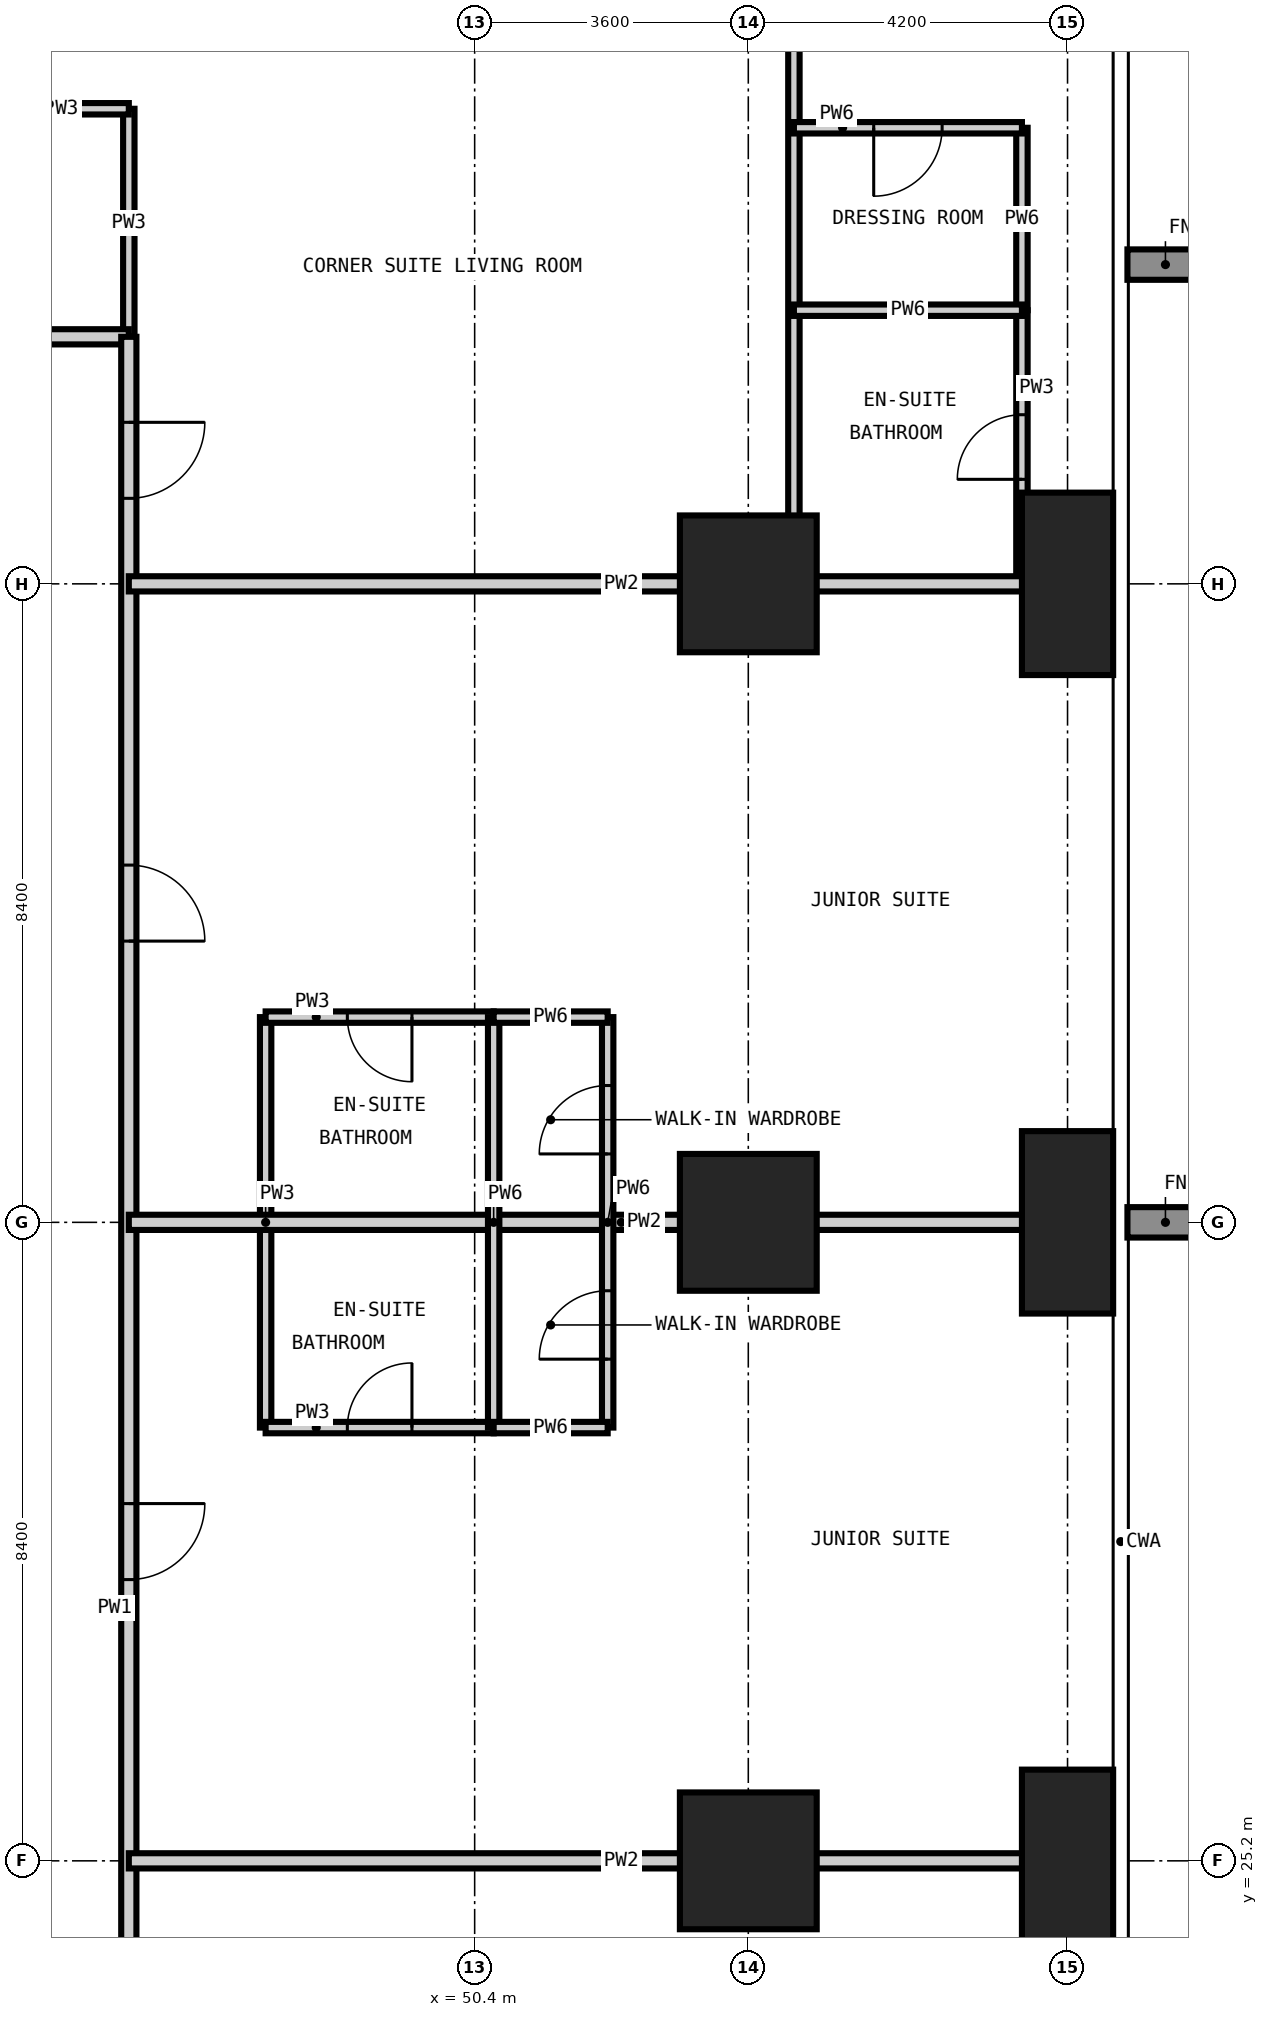
"""IFC4 building model, lengths in metres.
Left out: names, types, materials, properties, quantities, classifications, styles, units other than length and angle.
Written with IfcOpenShell. Run it as: python <this file> out.ifc"""

import sys

from ifc_helpers import new_model, si_unit, direction, frame, frame_2d, origin, origin_2d, place, context, subcontext, project, spatial, rectangle, extrude, element, fill, save


model = new_model("IFC4")
c1 = context("Model", 3, precision=1e-05, world=origin(), true_north=direction((0.0, 1.0)))
c2 = subcontext(c1, "Body", "Model", "MODEL_VIEW")
j1 = project(units=[si_unit("LENGTHUNIT", "METRE"), si_unit("PLANEANGLEUNIT", "RADIAN")], contexts=[c1])
p1 = place(None, origin())
s1 = spatial("IfcSite", under=j1, at=p1, CompositionType="ELEMENT")
p2 = place(p1, origin())
s2 = spatial("IfcBuilding", under=s1, at=p2, CompositionType="ELEMENT")
p3 = place(p2, frame((0.0, 0.0, 34.2)))
s3 = spatial("IfcBuildingStorey", under=s2, at=p3, CompositionType="ELEMENT", Elevation=34.2)
for number, where, z_axis, x_axis in (
    (1, (54.0, 25.2, -0.35), (0.0, 0.0, 1.0), (1.0, 0.0, 0.0)),
    (2, (54.0, 33.6, -0.35), (0.0, 0.0, 1.0), (1.0, 0.0, 0.0)),
    (3, (54.0, 42.0, -0.35), (0.0, 0.0, 1.0), (1.0, 0.0, 0.0)),
):
    element("IfcColumn", number, at=place(p3, frame(where, z_axis=z_axis, x_axis=x_axis)), inside=s3, PredefinedType="COLUMN", context=c2, shape_type="SweptSolid", body=[
        extrude(rectangle(XDim=1.8, YDim=1.8, at=origin_2d()), origin(), (0.0, 0.0, 1.0), 3.6),
    ])
for number, where, z_axis, x_axis in (
    (4, (58.2, 25.2, -0.35), (0.0, 0.0, 1.0), (1.0, 0.0, 0.0)),
    (5, (58.2, 33.6, -0.35), (0.0, 0.0, 1.0), (1.0, 0.0, 0.0)),
    (6, (58.2, 42.0, -0.35), (0.0, 0.0, 1.0), (1.0, 0.0, 0.0)),
):
    element("IfcColumn", number, at=place(p3, frame(where, z_axis=z_axis, x_axis=x_axis)), inside=s3, PredefinedType="COLUMN", context=c2, shape_type="SweptSolid", body=[
        extrude(rectangle(XDim=1.2, YDim=2.4, at=origin_2d()), origin(), (0.0, 0.0, 1.0), 3.6),
    ])
p4 = place(p3, frame((45.85, 45.25, 0.0), z_axis=(0.0, 0.0, 1.0), x_axis=(0.0, 1.0, 0.0)))
e7 = element("IfcWall", 7, at=p4, inside=s3, PredefinedType="PARTITIONING", context=c2, shape_type="SweptSolid", body=[
    extrude(rectangle(XDim=3.0, YDim=0.15, at=frame_2d((1.5, 0.0))), origin(), (0.0, 0.0, 1.0), 3.25),
])
p5 = place(p3, frame((47.65, 30.9, 0.0), z_axis=(0.0, 0.0, 1.0), x_axis=(0.0, 1.0, 0.0)))
e8 = element("IfcWall", 8, at=p5, inside=s3, PredefinedType="PARTITIONING", context=c2, shape_type="SweptSolid", body=[
    extrude(rectangle(XDim=5.4, YDim=0.15, at=frame_2d((2.7, 0.0))), origin(), (0.0, 0.0, 1.0), 3.25),
])
p6 = place(p3, frame((57.6, 42.0, 0.0), z_axis=(0.0, 0.0, 1.0), x_axis=(0.0, 1.0, 0.0)))
e9 = element("IfcWall", 9, at=p6, inside=s3, PredefinedType="PARTITIONING", context=c2, shape_type="SweptSolid", body=[
    extrude(rectangle(XDim=3.6, YDim=0.15, at=frame_2d((1.8, 0.0))), origin(), (0.0, 0.0, 1.0), 3.25),
])
p7 = place(p6, frame((1.375, 0.0, 0.0)))
e10 = element("IfcOpeningElement", 10, at=p7, cuts=e9, PredefinedType="OPENING", context=c2, shape_type="SweptSolid", body=[
    extrude(rectangle(XDim=0.85, YDim=2.1, at=frame_2d((0.425, 1.05))), frame((0.0, 0.085, 0.0), z_axis=(0.0, -1.0, 0.0), x_axis=(1.0, 0.0, 0.0)), (0.0, 0.0, 1.0), 0.17),
])
p8 = place(p3, frame((47.65, 30.9, 0.0), z_axis=(0.0, 0.0, 1.0), x_axis=(1.0, 0.0, 0.0)))
e11 = element("IfcWall", 11, at=p8, inside=s3, PredefinedType="PARTITIONING", context=c2, shape_type="SweptSolid", body=[
    extrude(rectangle(XDim=3.0, YDim=0.15, at=frame_2d((1.5, 0.0))), origin(), (0.0, 0.0, 1.0), 3.25),
])
p9 = place(p8, frame((1.075, 0.0, 0.0)))
e12 = element("IfcOpeningElement", 12, at=p9, cuts=e11, PredefinedType="OPENING", context=c2, shape_type="SweptSolid", body=[
    extrude(rectangle(XDim=0.85, YDim=2.1, at=frame_2d((0.425, 1.05))), frame((0.0, 0.085, 0.0), z_axis=(0.0, -1.0, 0.0), x_axis=(1.0, 0.0, 0.0)), (0.0, 0.0, 1.0), 0.17),
])
p10 = place(p3, frame((47.65, 36.3, 0.0), z_axis=(0.0, 0.0, 1.0), x_axis=(1.0, 0.0, 0.0)))
e13 = element("IfcWall", 13, at=p10, inside=s3, PredefinedType="PARTITIONING", context=c2, shape_type="SweptSolid", body=[
    extrude(rectangle(XDim=3.0, YDim=0.15, at=frame_2d((1.5, 0.0))), origin(), (0.0, 0.0, 1.0), 3.25),
])
p11 = place(p10, frame((1.075, 0.0, 0.0)))
e14 = element("IfcOpeningElement", 14, at=p11, cuts=e13, PredefinedType="OPENING", context=c2, shape_type="SweptSolid", body=[
    extrude(rectangle(XDim=0.85, YDim=2.1, at=frame_2d((0.425, 1.05))), frame((0.0, 0.085, 0.0), z_axis=(0.0, -1.0, 0.0), x_axis=(1.0, 0.0, 0.0)), (0.0, 0.0, 1.0), 0.17),
])
p12 = place(p3, frame((42.0, 48.25, 0.0), z_axis=(0.0, 0.0, 1.0), x_axis=(1.0, 0.0, 0.0)))
e15 = element("IfcWall", 15, at=p12, inside=s3, PredefinedType="PARTITIONING", context=c2, shape_type="SweptSolid", body=[
    extrude(rectangle(XDim=3.85, YDim=0.15, at=frame_2d((1.925, 0.0))), origin(), (0.0, 0.0, 1.0), 3.25),
])
p13 = place(p12, frame((1.5, 0.0, 0.0)))
e16 = element("IfcOpeningElement", 16, at=p13, cuts=e15, PredefinedType="OPENING", context=c2, shape_type="SweptSolid", body=[
    extrude(rectangle(XDim=0.85, YDim=2.1, at=frame_2d((0.425, 1.05))), frame((0.0, 0.085, 0.0), z_axis=(0.0, -1.0, 0.0), x_axis=(1.0, 0.0, 0.0)), (0.0, 0.0, 1.0), 0.17),
])
p14 = place(p3, frame((13.25, 45.25, 0.0), z_axis=(0.0, 0.0, 1.0), x_axis=(1.0, 0.0, 0.0)))
e17 = element("IfcWall", 17, at=p14, inside=s3, PredefinedType="PARTITIONING", context=c2, shape_type="SweptSolid", body=[
    extrude(rectangle(XDim=32.6, YDim=0.2, at=frame_2d((16.3, 0.0))), origin(), (0.0, 0.0, 1.0), 3.25),
])
p15 = place(p14, frame((6.5, 0.0, 0.0)))
e18 = element("IfcOpeningElement", 18, at=p15, cuts=e17, PredefinedType="OPENING", context=c2, shape_type="SweptSolid", body=[
    extrude(rectangle(XDim=1.0, YDim=2.2, at=frame_2d((0.5, 1.1))), frame((0.0, 0.11, 0.0), z_axis=(0.0, -1.0, 0.0), x_axis=(1.0, 0.0, 0.0)), (0.0, 0.0, 1.0), 0.22),
])
p16 = place(p14, frame((11.45, 0.0, 0.0)))
e19 = element("IfcOpeningElement", 19, at=p16, cuts=e17, PredefinedType="OPENING", context=c2, shape_type="SweptSolid", body=[
    extrude(rectangle(XDim=1.0, YDim=2.2, at=frame_2d((0.5, 1.1))), frame((0.0, 0.11, 0.0), z_axis=(0.0, -1.0, 0.0), x_axis=(1.0, 0.0, 0.0)), (0.0, 0.0, 1.0), 0.22),
])
p17 = place(p14, frame((19.85, 0.0, 0.0)))
e20 = element("IfcOpeningElement", 20, at=p17, cuts=e17, PredefinedType="OPENING", context=c2, shape_type="SweptSolid", body=[
    extrude(rectangle(XDim=1.0, YDim=2.2, at=frame_2d((0.5, 1.1))), frame((0.0, 0.11, 0.0), z_axis=(0.0, -1.0, 0.0), x_axis=(1.0, 0.0, 0.0)), (0.0, 0.0, 1.0), 0.22),
])
p18 = place(p14, frame((24.8, 0.0, 0.0)))
e21 = element("IfcOpeningElement", 21, at=p18, cuts=e17, PredefinedType="OPENING", context=c2, shape_type="SweptSolid", body=[
    extrude(rectangle(XDim=1.0, YDim=2.2, at=frame_2d((0.5, 1.1))), frame((0.0, 0.11, 0.0), z_axis=(0.0, -1.0, 0.0), x_axis=(1.0, 0.0, 0.0)), (0.0, 0.0, 1.0), 0.22),
])
p19 = place(p3, frame((45.85, 45.25, 0.0), z_axis=(0.0, 0.0, 1.0), x_axis=(0.0, -1.0, 0.0)))
e22 = element("IfcWall", 22, at=p19, inside=s3, PredefinedType="PARTITIONING", context=c2, shape_type="SweptSolid", body=[
    extrude(rectangle(XDim=32.0, YDim=0.2, at=frame_2d((16.0, 0.0))), origin(), (0.0, 0.0, 1.0), 3.25),
])
p20 = place(p19, frame((23.75, 0.0, 0.0)))
e23 = element("IfcOpeningElement", 23, at=p20, cuts=e22, PredefinedType="OPENING", context=c2, shape_type="SweptSolid", body=[
    extrude(rectangle(XDim=1.0, YDim=2.2, at=frame_2d((0.5, 1.1))), frame((0.0, 0.11, 0.0), z_axis=(0.0, -1.0, 0.0), x_axis=(1.0, 0.0, 0.0)), (0.0, 0.0, 1.0), 0.22),
])
p21 = place(p19, frame((15.35, 0.0, 0.0)))
e24 = element("IfcOpeningElement", 24, at=p21, cuts=e22, PredefinedType="OPENING", context=c2, shape_type="SweptSolid", body=[
    extrude(rectangle(XDim=1.0, YDim=2.2, at=frame_2d((0.5, 1.1))), frame((0.0, 0.11, 0.0), z_axis=(0.0, -1.0, 0.0), x_axis=(1.0, 0.0, 0.0)), (0.0, 0.0, 1.0), 0.22),
])
p22 = place(p19, frame((6.95, 0.0, 0.0)))
e25 = element("IfcOpeningElement", 25, at=p22, cuts=e22, PredefinedType="OPENING", context=c2, shape_type="SweptSolid", body=[
    extrude(rectangle(XDim=1.0, YDim=2.2, at=frame_2d((0.5, 1.1))), frame((0.0, 0.11, 0.0), z_axis=(0.0, -1.0, 0.0), x_axis=(1.0, 0.0, 0.0)), (0.0, 0.0, 1.0), 0.22),
])
p23 = place(p19, frame((29.725, 0.0, 0.0)))
e26 = element("IfcOpeningElement", 26, at=p23, cuts=e22, PredefinedType="OPENING", context=c2, shape_type="SweptSolid", body=[
    extrude(rectangle(XDim=1.0, YDim=2.2, at=frame_2d((0.5, 1.1))), frame((0.0, 0.11, 0.0), z_axis=(0.0, -1.0, 0.0), x_axis=(1.0, 0.0, 0.0)), (0.0, 0.0, 1.0), 0.22),
])
p24 = place(p19, frame((1.125, 0.0, 0.0)))
e27 = element("IfcOpeningElement", 27, at=p24, cuts=e22, PredefinedType="OPENING", context=c2, shape_type="SweptSolid", body=[
    extrude(rectangle(XDim=1.0, YDim=2.2, at=frame_2d((0.5, 1.1))), frame((0.0, 0.11, 0.0), z_axis=(0.0, -1.0, 0.0), x_axis=(1.0, 0.0, 0.0)), (0.0, 0.0, 1.0), 0.22),
])
for number, where, z_axis, x_axis in (
    (28, (45.85, 25.2, 0.0), (0.0, 0.0, 1.0), (1.0, 0.0, 0.0)),
    (29, (45.85, 33.6, 0.0), (0.0, 0.0, 1.0), (1.0, 0.0, 0.0)),
    (30, (45.85, 42.0, 0.0), (0.0, 0.0, 1.0), (1.0, 0.0, 0.0)),
):
    element("IfcWall", number, at=place(p3, frame(where, z_axis=z_axis, x_axis=x_axis)), inside=s3, PredefinedType="PARTITIONING", context=c2, shape_type="SweptSolid", body=[
        extrude(rectangle(XDim=12.958, YDim=0.2, at=frame_2d((6.479, 0.0))), origin(), (0.0, 0.0, 1.0), 3.25),
    ])
p25 = place(p3, frame((50.65, 30.9, 0.0), z_axis=(0.0, 0.0, 1.0), x_axis=(0.0, 1.0, 0.0)))
e31 = element("IfcWall", 31, at=p25, inside=s3, PredefinedType="PARTITIONING", context=c2, shape_type="SweptSolid", body=[
    extrude(rectangle(XDim=5.4, YDim=0.15, at=frame_2d((2.7, 0.0))), origin(), (0.0, 0.0, 1.0), 3.25),
])
p26 = place(p3, frame((52.15, 30.9, 0.0), z_axis=(0.0, 0.0, 1.0), x_axis=(0.0, 1.0, 0.0)))
e32 = element("IfcWall", 32, at=p26, inside=s3, PredefinedType="PARTITIONING", context=c2, shape_type="SweptSolid", body=[
    extrude(rectangle(XDim=5.4, YDim=0.15, at=frame_2d((2.7, 0.0))), origin(), (0.0, 0.0, 1.0), 3.25),
])
p27 = place(p26, frame((0.9, 0.0, 0.0)))
e33 = element("IfcOpeningElement", 33, at=p27, cuts=e32, PredefinedType="OPENING", context=c2, shape_type="SweptSolid", body=[
    extrude(rectangle(XDim=0.9, YDim=2.1, at=frame_2d((0.45, 1.05))), frame((0.0, 0.085, 0.0), z_axis=(0.0, -1.0, 0.0), x_axis=(1.0, 0.0, 0.0)), (0.0, 0.0, 1.0), 0.17),
])
p28 = place(p26, frame((3.6, 0.0, 0.0)))
e34 = element("IfcOpeningElement", 34, at=p28, cuts=e32, PredefinedType="OPENING", context=c2, shape_type="SweptSolid", body=[
    extrude(rectangle(XDim=0.9, YDim=2.1, at=frame_2d((0.45, 1.05))), frame((0.0, 0.085, 0.0), z_axis=(0.0, -1.0, 0.0), x_axis=(1.0, 0.0, 0.0)), (0.0, 0.0, 1.0), 0.17),
])
p29 = place(p3, frame((54.6, 42.0, 0.0), z_axis=(0.0, 0.0, 1.0), x_axis=(0.0, 1.0, 0.0)))
e35 = element("IfcWall", 35, at=p29, inside=s3, PredefinedType="PARTITIONING", context=c2, shape_type="SweptSolid", body=[
    extrude(rectangle(XDim=16.808, YDim=0.15, at=frame_2d((8.404, 0.0))), origin(), (0.0, 0.0, 1.0), 3.25),
])
p30 = place(p29, frame((10.95, 0.0, 0.0)))
e36 = element("IfcOpeningElement", 36, at=p30, cuts=e35, PredefinedType="OPENING", context=c2, shape_type="SweptSolid", body=[
    extrude(rectangle(XDim=0.9, YDim=2.1, at=frame_2d((0.45, 1.05))), frame((0.0, 0.085, 0.0), z_axis=(0.0, -1.0, 0.0), x_axis=(1.0, 0.0, 0.0)), (0.0, 0.0, 1.0), 0.17),
])
p31 = place(p3, frame((57.6, 45.6, 0.0), z_axis=(0.0, 0.0, 1.0), x_axis=(0.0, 1.0, 0.0)))
e37 = element("IfcWall", 37, at=p31, inside=s3, PredefinedType="PARTITIONING", context=c2, shape_type="SweptSolid", body=[
    extrude(rectangle(XDim=2.4, YDim=0.15, at=frame_2d((1.2, 0.0))), origin(), (0.0, 0.0, 1.0), 3.25),
])
for number, where, z_axis, x_axis in (
    (38, (50.65, 30.9, 0.0), (0.0, 0.0, 1.0), (1.0, 0.0, 0.0)),
    (39, (50.65, 36.3, 0.0), (0.0, 0.0, 1.0), (1.0, 0.0, 0.0)),
):
    element("IfcWall", number, at=place(p3, frame(where, z_axis=z_axis, x_axis=x_axis)), inside=s3, PredefinedType="PARTITIONING", context=c2, shape_type="SweptSolid", body=[
        extrude(rectangle(XDim=1.5, YDim=0.15, at=frame_2d((0.75, 0.0))), origin(), (0.0, 0.0, 1.0), 3.25),
    ])
p32 = place(p3, frame((54.6, 45.6, 0.0), z_axis=(0.0, 0.0, 1.0), x_axis=(1.0, 0.0, 0.0)))
e40 = element("IfcWall", 40, at=p32, inside=s3, PredefinedType="PARTITIONING", context=c2, shape_type="SweptSolid", body=[
    extrude(rectangle(XDim=3.0, YDim=0.15, at=frame_2d((1.5, 0.0))), origin(), (0.0, 0.0, 1.0), 3.25),
])
p33 = place(p3, frame((54.6, 48.0, 0.0), z_axis=(0.0, 0.0, 1.0), x_axis=(1.0, 0.0, 0.0)))
e41 = element("IfcWall", 41, at=p33, inside=s3, PredefinedType="PARTITIONING", context=c2, shape_type="SweptSolid", body=[
    extrude(rectangle(XDim=3.0, YDim=0.15, at=frame_2d((1.5, 0.0))), origin(), (0.0, 0.0, 1.0), 3.25),
])
p34 = place(p33, frame((1.05, 0.0, 0.0)))
e42 = element("IfcOpeningElement", 42, at=p34, cuts=e41, PredefinedType="OPENING", context=c2, shape_type="SweptSolid", body=[
    extrude(rectangle(XDim=0.9, YDim=2.1, at=frame_2d((0.45, 1.05))), frame((0.0, 0.085, 0.0), z_axis=(0.0, -1.0, 0.0), x_axis=(1.0, 0.0, 0.0)), (0.0, 0.0, 1.0), 0.17),
])
p35 = place(p21, origin())
e43 = element("IfcDoor", 43, at=p35, inside=s3, OperationType="SINGLE_SWING_LEFT", PredefinedType="DOOR", context=c2, shape_type="SweptSolid", body=[
    extrude(rectangle(XDim=1.0, YDim=2.2, at=frame_2d((0.5, 1.1))), frame((0.0, 0.025, 0.0), z_axis=(0.0, -1.0, 0.0), x_axis=(1.0, 0.0, 0.0)), (0.0, 0.0, 1.0), 0.05),
])
fill(e24, e43)
p36 = place(p9, origin())
e44 = element("IfcDoor", 44, at=p36, inside=s3, OperationType="SINGLE_SWING_RIGHT", PredefinedType="DOOR", context=c2, shape_type="SweptSolid", body=[
    extrude(rectangle(XDim=0.85, YDim=2.1, at=frame_2d((0.425, 1.05))), frame((0.0, 0.025, 0.0), z_axis=(0.0, -1.0, 0.0), x_axis=(1.0, 0.0, 0.0)), (0.0, 0.0, 1.0), 0.05),
])
fill(e12, e44)
p37 = place(p27, origin())
e45 = element("IfcDoor", 45, at=p37, inside=s3, OperationType="SINGLE_SWING_LEFT", PredefinedType="DOOR", context=c2, shape_type="SweptSolid", body=[
    extrude(rectangle(XDim=0.9, YDim=2.1, at=frame_2d((0.45, 1.05))), frame((0.0, 0.025, 0.0), z_axis=(0.0, -1.0, 0.0), x_axis=(1.0, 0.0, 0.0)), (0.0, 0.0, 1.0), 0.05),
])
fill(e33, e45)
p38 = place(p22, origin())
e46 = element("IfcDoor", 46, at=p38, inside=s3, OperationType="SINGLE_SWING_RIGHT", PredefinedType="DOOR", context=c2, shape_type="SweptSolid", body=[
    extrude(rectangle(XDim=1.0, YDim=2.2, at=frame_2d((0.5, 1.1))), frame((0.0, 0.025, 0.0), z_axis=(0.0, -1.0, 0.0), x_axis=(1.0, 0.0, 0.0)), (0.0, 0.0, 1.0), 0.05),
])
fill(e25, e46)
p39 = place(p11, frame((0.85, 0.0, 0.0), z_axis=(0.0, 0.0, 1.0), x_axis=(-1.0, 0.0, 0.0)))
e47 = element("IfcDoor", 47, at=p39, inside=s3, OperationType="SINGLE_SWING_LEFT", PredefinedType="DOOR", context=c2, shape_type="SweptSolid", body=[
    extrude(rectangle(XDim=0.85, YDim=2.1, at=frame_2d((0.425, 1.05))), frame((0.0, 0.025, 0.0), z_axis=(0.0, -1.0, 0.0), x_axis=(1.0, 0.0, 0.0)), (0.0, 0.0, 1.0), 0.05),
])
fill(e14, e47)
p40 = place(p28, origin())
e48 = element("IfcDoor", 48, at=p40, inside=s3, OperationType="SINGLE_SWING_LEFT", PredefinedType="DOOR", context=c2, shape_type="SweptSolid", body=[
    extrude(rectangle(XDim=0.9, YDim=2.1, at=frame_2d((0.45, 1.05))), frame((0.0, 0.025, 0.0), z_axis=(0.0, -1.0, 0.0), x_axis=(1.0, 0.0, 0.0)), (0.0, 0.0, 1.0), 0.05),
])
fill(e34, e48)
p41 = place(p24, origin())
e49 = element("IfcDoor", 49, at=p41, inside=s3, OperationType="SINGLE_SWING_LEFT", PredefinedType="DOOR", context=c2, shape_type="SweptSolid", body=[
    extrude(rectangle(XDim=1.0, YDim=2.2, at=frame_2d((0.5, 1.1))), frame((0.0, 0.025, 0.0), z_axis=(0.0, -1.0, 0.0), x_axis=(1.0, 0.0, 0.0)), (0.0, 0.0, 1.0), 0.05),
])
fill(e27, e49)
p42 = place(p7, origin())
e50 = element("IfcDoor", 50, at=p42, inside=s3, OperationType="SINGLE_SWING_LEFT", PredefinedType="DOOR", context=c2, shape_type="SweptSolid", body=[
    extrude(rectangle(XDim=0.85, YDim=2.1, at=frame_2d((0.425, 1.05))), frame((0.0, 0.025, 0.0), z_axis=(0.0, -1.0, 0.0), x_axis=(1.0, 0.0, 0.0)), (0.0, 0.0, 1.0), 0.05),
])
fill(e10, e50)
p43 = place(p34, frame((0.9, 0.0, 0.0), z_axis=(0.0, 0.0, 1.0), x_axis=(-1.0, 0.0, 0.0)))
e51 = element("IfcDoor", 51, at=p43, inside=s3, OperationType="SINGLE_SWING_RIGHT", PredefinedType="DOOR", context=c2, shape_type="SweptSolid", body=[
    extrude(rectangle(XDim=0.9, YDim=2.1, at=frame_2d((0.45, 1.05))), frame((0.0, 0.025, 0.0), z_axis=(0.0, -1.0, 0.0), x_axis=(1.0, 0.0, 0.0)), (0.0, 0.0, 1.0), 0.05),
])
fill(e42, e51)
save(model, sys.argv[1])
